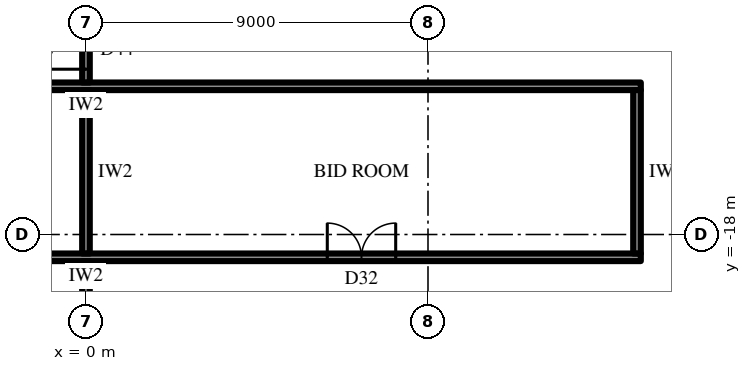
"""IFC4 building model, lengths in metres.
Left out: names, types, materials, properties, quantities, classifications, styles, units other than length and angle.
Written with IfcOpenShell. Run it as: python <this file> out.ifc"""

import sys

from ifc_helpers import new_model, si_unit, direction, frame, frame_2d, origin, place, context, subcontext, project, spatial, rectangle, extrude, element, fill, save


model = new_model("IFC4")
c1 = context("Model", 3, precision=1e-05, world=origin(), true_north=direction((0.0, 1.0)))
c2 = subcontext(c1, "Body", "Model", "MODEL_VIEW")
j1 = project(units=[si_unit("LENGTHUNIT", "METRE"), si_unit("PLANEANGLEUNIT", "RADIAN")], contexts=[c1])
p1 = place(None, origin())
s1 = spatial("IfcSite", under=j1, at=p1, CompositionType="ELEMENT")
p2 = place(p1, origin())
s2 = spatial("IfcBuilding", under=s1, at=p2, CompositionType="ELEMENT")
p3 = place(p2, frame((0.0, 0.0, 261.7)))
s3 = spatial("IfcBuildingStorey", under=s2, at=p3, CompositionType="ELEMENT", Elevation=261.7)
p4 = place(p3, frame((14.6, -14.1, 0.0), z_axis=(0.0, 0.0, 1.0), x_axis=(-1.0, 0.0, 0.0)))
e1 = element("IfcWall", 1, at=p4, inside=s3, PredefinedType="PARTITIONING", context=c2, shape_type="SweptSolid", body=[
    extrude(rectangle(XDim=29.2, YDim=0.2, at=frame_2d((14.6, 0.0))), origin(), (0.0, 0.0, 1.0), 4.0),
])
p5 = place(p3, frame((14.6, -18.6, 0.0), z_axis=(0.0, 0.0, 1.0), x_axis=(-1.0, 0.0, 0.0)))
e2 = element("IfcWall", 2, at=p5, inside=s3, PredefinedType="PARTITIONING", context=c2, shape_type="SweptSolid", body=[
    extrude(rectangle(XDim=29.2, YDim=0.2, at=frame_2d((14.6, 0.0))), origin(), (0.0, 0.0, 1.0), 4.0),
])
p6 = place(p5, frame((6.45, 0.0, 0.0)))
e3 = element("IfcOpeningElement", 3, at=p6, cuts=e2, PredefinedType="OPENING", context=c2, shape_type="SweptSolid", body=[
    extrude(rectangle(XDim=1.8, YDim=2.4, at=frame_2d((0.9, 1.2))), frame((0.0, 0.11, 0.0), z_axis=(0.0, -1.0, 0.0), x_axis=(1.0, 0.0, 0.0)), (0.0, 0.0, 1.0), 0.22),
])
p7 = place(p5, frame((20.95, 0.0, 0.0)))
e4 = element("IfcOpeningElement", 4, at=p7, cuts=e2, PredefinedType="OPENING", context=c2, shape_type="SweptSolid", body=[
    extrude(rectangle(XDim=1.8, YDim=2.4, at=frame_2d((0.9, 1.2))), frame((0.0, 0.11, 0.0), z_axis=(0.0, -1.0, 0.0), x_axis=(1.0, 0.0, 0.0)), (0.0, 0.0, 1.0), 0.22),
])
p8 = place(p3, frame((14.5, -14.2, 0.0), z_axis=(0.0, 0.0, 1.0), x_axis=(0.0, -1.0, 0.0)))
e5 = element("IfcWall", 5, at=p8, inside=s3, PredefinedType="PARTITIONING", context=c2, shape_type="SweptSolid", body=[
    extrude(rectangle(XDim=4.3, YDim=0.2, at=frame_2d((2.15, 0.0))), origin(), (0.0, 0.0, 1.0), 4.0),
])
p9 = place(p3, frame((0.0, -14.2, 0.0), z_axis=(0.0, 0.0, 1.0), x_axis=(0.0, -1.0, 0.0)))
e6 = element("IfcWall", 6, at=p9, inside=s3, PredefinedType="PARTITIONING", context=c2, shape_type="SweptSolid", body=[
    extrude(rectangle(XDim=4.3, YDim=0.2, at=frame_2d((2.15, 0.0))), origin(), (0.0, 0.0, 1.0), 2.992),
])
p10 = place(p3, frame((0.0, -12.3, 0.0), z_axis=(0.0, 0.0, 1.0), x_axis=(0.0, -1.0, 0.0)))
e7 = element("IfcWall", 7, at=p10, inside=s3, PredefinedType="PARTITIONING", context=c2, shape_type="SweptSolid", body=[
    extrude(rectangle(XDim=1.7, YDim=0.2, at=frame_2d((0.85, 0.0))), origin(), (0.0, 0.0, 1.0), 2.992),
])
p11 = place(p10, frame((0.35, 0.0, 0.0)))
e8 = element("IfcOpeningElement", 8, at=p11, cuts=e7, PredefinedType="OPENING", context=c2, shape_type="SweptSolid", body=[
    extrude(rectangle(XDim=1.0, YDim=2.2, at=frame_2d((0.5, 1.1))), frame((0.0, 0.11, 0.0), z_axis=(0.0, -1.0, 0.0), x_axis=(1.0, 0.0, 0.0)), (0.0, 0.0, 1.0), 0.22),
])
p12 = place(p3, frame((0.0, -18.7, 0.0), z_axis=(0.0, 0.0, 1.0), x_axis=(0.0, -1.0, 0.0)))
e9 = element("IfcWall", 9, at=p12, inside=s3, PredefinedType="PARTITIONING", context=c2, shape_type="SweptSolid", body=[
    extrude(rectangle(XDim=9.15, YDim=0.2, at=frame_2d((4.575, 0.0))), origin(), (0.0, 0.0, 1.0), 2.992),
])
p13 = place(p6, frame((1.8, 0.0, 0.0), z_axis=(0.0, 0.0, 1.0), x_axis=(-1.0, 0.0, 0.0)))
e10 = element("IfcDoor", 10, at=p13, inside=s3, OperationType="DOUBLE_DOOR_SINGLE_SWING", PredefinedType="DOOR", context=c2, shape_type="SweptSolid", body=[
    extrude(rectangle(XDim=1.8, YDim=2.4, at=frame_2d((0.9, 1.2))), frame((0.0, 0.025, 0.0), z_axis=(0.0, -1.0, 0.0), x_axis=(1.0, 0.0, 0.0)), (0.0, 0.0, 1.0), 0.05),
])
fill(e3, e10)
p14 = place(p11, frame((1.0, 0.0, 0.0), z_axis=(0.0, 0.0, 1.0), x_axis=(-1.0, 0.0, 0.0)))
e11 = element("IfcDoor", 11, at=p14, inside=s3, OperationType="SINGLE_SWING_RIGHT", PredefinedType="DOOR", context=c2, shape_type="SweptSolid", body=[
    extrude(rectangle(XDim=1.0, YDim=2.2, at=frame_2d((0.5, 1.1))), frame((0.0, 0.025, 0.0), z_axis=(0.0, -1.0, 0.0), x_axis=(1.0, 0.0, 0.0)), (0.0, 0.0, 1.0), 0.05),
])
fill(e8, e11)
save(model, sys.argv[1])
